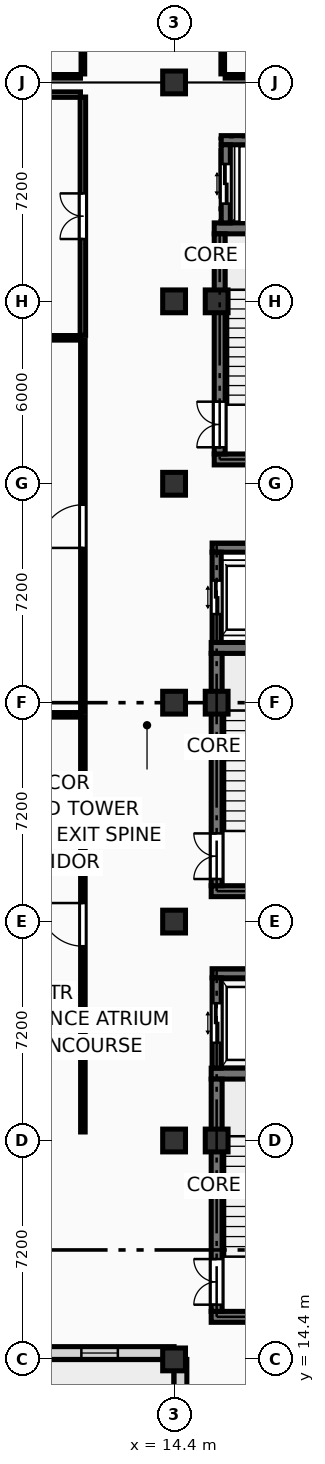
"""IFC4 building model, lengths in metres.
Left out: names, types, materials, properties, quantities, classifications, styles, units other than length and angle.
Written with IfcOpenShell. Run it as: python <this file> out.ifc"""

import sys

from ifc_helpers import new_model, si_unit, direction, frame, frame_2d, origin, origin_2d, place, context, subcontext, project, spatial, rectangle, extrude, element, fill, save


model = new_model("IFC4")
c1 = context("Model", 3, precision=1e-05, world=origin(), true_north=direction((0.0, 1.0)))
c2 = subcontext(c1, "Body", "Model", "MODEL_VIEW")
j1 = project(units=[si_unit("LENGTHUNIT", "METRE"), si_unit("PLANEANGLEUNIT", "RADIAN")], contexts=[c1])
p1 = place(None, origin())
s1 = spatial("IfcSite", under=j1, at=p1, CompositionType="ELEMENT")
p2 = place(p1, origin())
s2 = spatial("IfcBuilding", under=s1, at=p2, CompositionType="ELEMENT")
p3 = place(p2, origin())
s3 = spatial("IfcBuildingStorey", under=s2, at=p3, CompositionType="ELEMENT", Elevation=0.0)
for number, where, z_axis, x_axis in (
    (1, (14.4, 14.4, 0.0), (0.0, 0.0, 1.0), (1.0, 0.0, 0.0)),
    (2, (14.4, 21.6, 0.0), (0.0, 0.0, 1.0), (1.0, 0.0, 0.0)),
    (3, (14.4, 28.8, 0.0), (0.0, 0.0, 1.0), (1.0, 0.0, 0.0)),
    (4, (14.4, 36.0, 0.0), (0.0, 0.0, 1.0), (1.0, 0.0, 0.0)),
    (5, (14.4, 43.2, 0.0), (0.0, 0.0, 1.0), (1.0, 0.0, 0.0)),
    (6, (14.4, 49.2, 0.0), (0.0, 0.0, 1.0), (1.0, 0.0, 0.0)),
    (7, (14.4, 56.4, 0.0), (0.0, 0.0, 1.0), (1.0, 0.0, 0.0)),
    (8, (15.8, 21.6, 0.0), (0.0, 0.0, 1.0), (1.0, 0.0, 0.0)),
    (9, (15.8, 36.0, 0.0), (0.0, 0.0, 1.0), (1.0, 0.0, 0.0)),
    (10, (15.8, 49.2, 0.0), (0.0, 0.0, 1.0), (1.0, 0.0, 0.0)),
):
    element("IfcColumn", number, at=place(p3, frame(where, z_axis=z_axis, x_axis=x_axis)), inside=s3, PredefinedType="COLUMN", context=c2, shape_type="SweptSolid", body=[
        extrude(rectangle(XDim=0.75, YDim=0.75, at=origin_2d()), origin(), (0.0, 0.0, 1.0), 4.5),
    ])
p4 = place(p3, frame((14.61, 7.2, 0.0), z_axis=(0.0, 0.0, 1.0), x_axis=(0.0, 1.0, 0.0)))
e11 = element("IfcWall", 11, at=p4, inside=s3, PredefinedType="SOLIDWALL", context=c2, shape_type="SweptSolid", body=[
    extrude(rectangle(XDim=7.2, YDim=0.42, at=frame_2d((3.6, 0.0))), origin(), (0.0, 0.0, 1.0), 3.62),
])
p5 = place(p4, frame((1.783, 0.0, 0.45)))
e12 = element("IfcOpeningElement", 12, at=p5, cuts=e11, PredefinedType="OPENING", context=c2, shape_type="SweptSolid", body=[
    extrude(rectangle(XDim=1.3, YDim=2.35, at=frame_2d((0.65, 1.175))), frame((0.0, 0.222, 0.0), z_axis=(0.0, -1.0, 0.0), x_axis=(1.0, 0.0, 0.0)), (0.0, 0.0, 1.0), 0.444),
])
p6 = place(p4, frame((4.117, 0.0, 0.45)))
e13 = element("IfcOpeningElement", 13, at=p6, cuts=e11, PredefinedType="OPENING", context=c2, shape_type="SweptSolid", body=[
    extrude(rectangle(XDim=1.3, YDim=2.35, at=frame_2d((0.65, 1.175))), frame((0.0, 0.222, 0.0), z_axis=(0.0, -1.0, 0.0), x_axis=(1.0, 0.0, 0.0)), (0.0, 0.0, 1.0), 0.444),
])
p7 = place(p3, frame((7.2, 14.61, 0.0), z_axis=(0.0, 0.0, 1.0), x_axis=(1.0, 0.0, 0.0)))
e14 = element("IfcWall", 14, at=p7, inside=s3, PredefinedType="SOLIDWALL", context=c2, shape_type="SweptSolid", body=[
    extrude(rectangle(XDim=7.2, YDim=0.42, at=frame_2d((3.6, 0.0))), origin(), (0.0, 0.0, 1.0), 3.62),
])
p8 = place(p7, frame((1.85, 0.0, 0.45)))
e15 = element("IfcOpeningElement", 15, at=p8, cuts=e14, PredefinedType="OPENING", context=c2, shape_type="SweptSolid", body=[
    extrude(rectangle(XDim=1.2, YDim=2.35, at=frame_2d((0.6, 1.175))), frame((0.0, 0.222, 0.0), z_axis=(0.0, -1.0, 0.0), x_axis=(1.0, 0.0, 0.0)), (0.0, 0.0, 1.0), 0.444),
])
p9 = place(p7, frame((4.15, 0.0, 0.45)))
e16 = element("IfcOpeningElement", 16, at=p9, cuts=e14, PredefinedType="OPENING", context=c2, shape_type="SweptSolid", body=[
    extrude(rectangle(XDim=1.2, YDim=2.35, at=frame_2d((0.6, 1.175))), frame((0.0, 0.222, 0.0), z_axis=(0.0, -1.0, 0.0), x_axis=(1.0, 0.0, 0.0)), (0.0, 0.0, 1.0), 0.444),
])
for number, where, z_axis, x_axis in (
    (17, (15.62, 15.8, 0.0), (0.0, 0.0, 1.0), (1.0, 0.0, 0.0)),
    (18, (15.62, 23.8, 0.0), (0.0, 0.0, 1.0), (1.0, 0.0, 0.0)),
):
    element("IfcWall", number, at=place(p3, frame(where, z_axis=z_axis, x_axis=x_axis)), inside=s3, PredefinedType="SHEAR", context=c2, shape_type="SweptSolid", body=[
        extrude(rectangle(XDim=4.88, YDim=0.36, at=frame_2d((2.44, 0.0))), origin(), (0.0, 0.0, 1.0), 4.25),
    ])
p10 = place(p3, frame((15.8, 15.98, 0.0), z_axis=(0.0, 0.0, 1.0), x_axis=(0.0, 1.0, 0.0)))
e19 = element("IfcWall", 19, at=p10, inside=s3, PredefinedType="SHEAR", context=c2, shape_type="SweptSolid", body=[
    extrude(rectangle(XDim=7.64, YDim=0.36, at=frame_2d((3.82, 0.0))), origin(), (0.0, 0.0, 1.0), 4.25),
])
p11 = place(p10, frame((0.22, 0.0, 0.0)))
e20 = element("IfcOpeningElement", 20, at=p11, cuts=e19, PredefinedType="OPENING", context=c2, shape_type="SweptSolid", body=[
    extrude(rectangle(XDim=1.5, YDim=2.2, at=frame_2d((0.75, 1.1))), frame((0.0, 0.192, 0.0), z_axis=(0.0, -1.0, 0.0), x_axis=(1.0, 0.0, 0.0)), (0.0, 0.0, 1.0), 0.384),
])
for number, where, z_axis, x_axis in (
    (21, (15.62, 29.8, 0.0), (0.0, 0.0, 1.0), (1.0, 0.0, 0.0)),
    (22, (15.62, 37.8, 0.0), (0.0, 0.0, 1.0), (1.0, 0.0, 0.0)),
):
    element("IfcWall", number, at=place(p3, frame(where, z_axis=z_axis, x_axis=x_axis)), inside=s3, PredefinedType="SHEAR", context=c2, shape_type="SweptSolid", body=[
        extrude(rectangle(XDim=4.88, YDim=0.36, at=frame_2d((2.44, 0.0))), origin(), (0.0, 0.0, 1.0), 4.25),
    ])
p12 = place(p3, frame((15.8, 29.98, 0.0), z_axis=(0.0, 0.0, 1.0), x_axis=(0.0, 1.0, 0.0)))
e23 = element("IfcWall", 23, at=p12, inside=s3, PredefinedType="SHEAR", context=c2, shape_type="SweptSolid", body=[
    extrude(rectangle(XDim=7.64, YDim=0.36, at=frame_2d((3.82, 0.0))), origin(), (0.0, 0.0, 1.0), 4.25),
])
p13 = place(p12, frame((0.22, 0.0, 0.0)))
e24 = element("IfcOpeningElement", 24, at=p13, cuts=e23, PredefinedType="OPENING", context=c2, shape_type="SweptSolid", body=[
    extrude(rectangle(XDim=1.5, YDim=2.2, at=frame_2d((0.75, 1.1))), frame((0.0, 0.192, 0.0), z_axis=(0.0, -1.0, 0.0), x_axis=(1.0, 0.0, 0.0)), (0.0, 0.0, 1.0), 0.384),
])
for number, where, z_axis, x_axis in (
    (25, (15.72, 44.0, 0.0), (0.0, 0.0, 1.0), (1.0, 0.0, 0.0)),
    (26, (15.72, 51.6, 0.0), (0.0, 0.0, 1.0), (1.0, 0.0, 0.0)),
):
    element("IfcWall", number, at=place(p3, frame(where, z_axis=z_axis, x_axis=x_axis)), inside=s3, PredefinedType="SHEAR", context=c2, shape_type="SweptSolid", body=[
        extrude(rectangle(XDim=4.48, YDim=0.36, at=frame_2d((2.24, 0.0))), origin(), (0.0, 0.0, 1.0), 4.25),
    ])
p14 = place(p3, frame((15.9, 44.18, 0.0), z_axis=(0.0, 0.0, 1.0), x_axis=(0.0, 1.0, 0.0)))
e27 = element("IfcWall", 27, at=p14, inside=s3, PredefinedType="SHEAR", context=c2, shape_type="SweptSolid", body=[
    extrude(rectangle(XDim=7.24, YDim=0.36, at=frame_2d((3.62, 0.0))), origin(), (0.0, 0.0, 1.0), 4.25),
])
p15 = place(p14, frame((0.22, 0.0, 0.0)))
e28 = element("IfcOpeningElement", 28, at=p15, cuts=e27, PredefinedType="OPENING", context=c2, shape_type="SweptSolid", body=[
    extrude(rectangle(XDim=1.5, YDim=2.2, at=frame_2d((0.75, 1.1))), frame((0.0, 0.192, 0.0), z_axis=(0.0, -1.0, 0.0), x_axis=(1.0, 0.0, 0.0)), (0.0, 0.0, 1.0), 0.384),
])
p16 = place(p3, frame((15.65, 27.1, 0.0), z_axis=(0.0, 0.0, 1.0), x_axis=(1.0, 0.0, 0.0)))
e29 = element("IfcWall", 29, at=p16, inside=s3, PredefinedType="SHEAR", context=c2, shape_type="SweptSolid", body=[
    extrude(rectangle(XDim=2.56, YDim=0.3, at=frame_2d((1.28, 0.0))), origin(), (0.0, 0.0, 1.0), 4.25),
])
p17 = place(p3, frame((15.8, 23.98, 0.0), z_axis=(0.0, 0.0, 1.0), x_axis=(0.0, 1.0, 0.0)))
e30 = element("IfcWall", 30, at=p17, inside=s3, PredefinedType="SHEAR", context=c2, shape_type="SweptSolid", body=[
    extrude(rectangle(XDim=2.97, YDim=0.3, at=frame_2d((1.485, 0.0))), origin(), (0.0, 0.0, 1.0), 4.25),
])
p18 = place(p17, frame((0.835, 0.0, 0.0)))
e31 = element("IfcOpeningElement", 31, at=p18, cuts=e30, PredefinedType="OPENING", context=c2, shape_type="SweptSolid", body=[
    extrude(rectangle(XDim=1.3, YDim=2.25, at=frame_2d((0.65, 1.125))), frame((0.0, 0.162, 0.0), z_axis=(0.0, -1.0, 0.0), x_axis=(1.0, 0.0, 0.0)), (0.0, 0.0, 1.0), 0.324),
])
p19 = place(p3, frame((15.65, 41.1, 0.0), z_axis=(0.0, 0.0, 1.0), x_axis=(1.0, 0.0, 0.0)))
e32 = element("IfcWall", 32, at=p19, inside=s3, PredefinedType="SHEAR", context=c2, shape_type="SweptSolid", body=[
    extrude(rectangle(XDim=2.56, YDim=0.3, at=frame_2d((1.28, 0.0))), origin(), (0.0, 0.0, 1.0), 4.25),
])
p20 = place(p3, frame((15.8, 37.98, 0.0), z_axis=(0.0, 0.0, 1.0), x_axis=(0.0, 1.0, 0.0)))
e33 = element("IfcWall", 33, at=p20, inside=s3, PredefinedType="SHEAR", context=c2, shape_type="SweptSolid", body=[
    extrude(rectangle(XDim=2.97, YDim=0.3, at=frame_2d((1.485, 0.0))), origin(), (0.0, 0.0, 1.0), 4.25),
])
p21 = place(p20, frame((0.935, 0.0, 0.0)))
e34 = element("IfcOpeningElement", 34, at=p21, cuts=e33, PredefinedType="OPENING", context=c2, shape_type="SweptSolid", body=[
    extrude(rectangle(XDim=1.1, YDim=2.2, at=frame_2d((0.55, 1.1))), frame((0.0, 0.162, 0.0), z_axis=(0.0, -1.0, 0.0), x_axis=(1.0, 0.0, 0.0)), (0.0, 0.0, 1.0), 0.324),
])
p22 = place(p3, frame((15.95, 54.5, 0.0), z_axis=(0.0, 0.0, 1.0), x_axis=(1.0, 0.0, 0.0)))
e35 = element("IfcWall", 35, at=p22, inside=s3, PredefinedType="SHEAR", context=c2, shape_type="SweptSolid", body=[
    extrude(rectangle(XDim=3.0, YDim=0.3, at=frame_2d((1.5, 0.0))), origin(), (0.0, 0.0, 1.0), 4.25),
])
p23 = place(p3, frame((16.1, 51.78, 0.0), z_axis=(0.0, 0.0, 1.0), x_axis=(0.0, 1.0, 0.0)))
e36 = element("IfcWall", 36, at=p23, inside=s3, PredefinedType="SHEAR", context=c2, shape_type="SweptSolid", body=[
    extrude(rectangle(XDim=2.57, YDim=0.3, at=frame_2d((1.285, 0.0))), origin(), (0.0, 0.0, 1.0), 4.25),
])
p24 = place(p23, frame((0.635, 0.0, 0.0)))
e37 = element("IfcOpeningElement", 37, at=p24, cuts=e36, PredefinedType="OPENING", context=c2, shape_type="SweptSolid", body=[
    extrude(rectangle(XDim=1.3, YDim=2.25, at=frame_2d((0.65, 1.125))), frame((0.0, 0.162, 0.0), z_axis=(0.0, -1.0, 0.0), x_axis=(1.0, 0.0, 0.0)), (0.0, 0.0, 1.0), 0.324),
])
p25 = place(p3, frame((11.4, 21.88, 0.0), z_axis=(0.0, 0.0, 1.0), x_axis=(0.0, 1.0, 0.0)))
e38 = element("IfcWall", 38, at=p25, inside=s3, PredefinedType="PARTITIONING", context=c2, shape_type="SweptSolid", body=[
    extrude(rectangle(XDim=13.64, YDim=0.15, at=frame_2d((6.82, 0.0))), origin(), (0.0, 0.0, 1.0), 4.235),
])
p26 = place(p25, frame((6.11, 0.0, 0.0)))
e39 = element("IfcOpeningElement", 39, at=p26, cuts=e38, PredefinedType="OPENING", context=c2, shape_type="SweptSolid", body=[
    extrude(rectangle(XDim=1.42, YDim=2.22, at=frame_2d((0.71, 1.11))), frame((0.0, 0.087, 0.0), z_axis=(0.0, -1.0, 0.0), x_axis=(1.0, 0.0, 0.0)), (0.0, 0.0, 1.0), 0.174),
])
p27 = place(p3, frame((0.48, 35.6, 0.0), z_axis=(0.0, 0.0, 1.0), x_axis=(1.0, 0.0, 0.0)))
e40 = element("IfcWall", 40, at=p27, inside=s3, PredefinedType="PARTITIONING", context=c2, shape_type="SweptSolid", body=[
    extrude(rectangle(XDim=10.84, YDim=0.15, at=frame_2d((5.42, 0.0))), origin(), (0.0, 0.0, 1.0), 3.485),
])
p28 = place(p3, frame((11.4, 35.68, 0.0), z_axis=(0.0, 0.0, 1.0), x_axis=(0.0, 1.0, 0.0)))
e41 = element("IfcWall", 41, at=p28, inside=s3, PredefinedType="PARTITIONING", context=c2, shape_type="SweptSolid", body=[
    extrude(rectangle(XDim=12.24, YDim=0.15, at=frame_2d((6.12, 0.0))), origin(), (0.0, 0.0, 1.0), 4.235),
])
p29 = place(p28, frame((5.41, 0.0, 0.0)))
e42 = element("IfcOpeningElement", 42, at=p29, cuts=e41, PredefinedType="OPENING", context=c2, shape_type="SweptSolid", body=[
    extrude(rectangle(XDim=1.42, YDim=2.22, at=frame_2d((0.71, 1.11))), frame((0.0, 0.087, 0.0), z_axis=(0.0, -1.0, 0.0), x_axis=(1.0, 0.0, 0.0)), (0.0, 0.0, 1.0), 0.174),
])
p30 = place(p3, frame((0.48, 48.0, 0.0), z_axis=(0.0, 0.0, 1.0), x_axis=(1.0, 0.0, 0.0)))
e43 = element("IfcWall", 43, at=p30, inside=s3, PredefinedType="PARTITIONING", context=c2, shape_type="SweptSolid", body=[
    extrude(rectangle(XDim=10.84, YDim=0.15, at=frame_2d((5.42, 0.0))), origin(), (0.0, 0.0, 1.0), 4.235),
])
p31 = place(p3, frame((11.4, 48.08, 0.0), z_axis=(0.0, 0.0, 1.0), x_axis=(0.0, 1.0, 0.0)))
e44 = element("IfcWall", 44, at=p31, inside=s3, PredefinedType="PARTITIONING", context=c2, shape_type="SweptSolid", body=[
    extrude(rectangle(XDim=7.84, YDim=0.18, at=frame_2d((3.92, 0.0))), origin(), (0.0, 0.0, 1.0), 4.235),
])
p32 = place(p31, frame((3.17, 0.0, 0.0)))
e45 = element("IfcOpeningElement", 45, at=p32, cuts=e44, PredefinedType="OPENING", context=c2, shape_type="SweptSolid", body=[
    extrude(rectangle(XDim=1.5, YDim=2.25, at=frame_2d((0.75, 1.125))), frame((0.0, 0.102, 0.0), z_axis=(0.0, -1.0, 0.0), x_axis=(1.0, 0.0, 0.0)), (0.0, 0.0, 1.0), 0.204),
])
p33 = place(p3, frame((0.48, 56.0, 0.0), z_axis=(0.0, 0.0, 1.0), x_axis=(1.0, 0.0, 0.0)))
e46 = element("IfcWall", 46, at=p33, inside=s3, PredefinedType="PARTITIONING", context=c2, shape_type="SweptSolid", body=[
    extrude(rectangle(XDim=10.84, YDim=0.18, at=frame_2d((5.42, 0.0))), origin(), (0.0, 0.0, 1.0), 3.485),
])
p34 = place(p3, frame((0.48, 56.6, 0.0), z_axis=(0.0, 0.0, 1.0), x_axis=(1.0, 0.0, 0.0)))
e47 = element("IfcWall", 47, at=p34, inside=s3, PredefinedType="PARTITIONING", context=c2, shape_type="SweptSolid", body=[
    extrude(rectangle(XDim=10.84, YDim=0.12, at=frame_2d((5.42, 0.0))), origin(), (0.0, 0.0, 1.0), 3.485),
])
p35 = place(p3, frame((11.4, 56.68, 0.0), z_axis=(0.0, 0.0, 1.0), x_axis=(0.0, 1.0, 0.0)))
e48 = element("IfcWall", 48, at=p35, inside=s3, PredefinedType="PARTITIONING", context=c2, shape_type="SweptSolid", body=[
    extrude(rectangle(XDim=28.44, YDim=0.12, at=frame_2d((14.22, 0.0))), origin(), (0.0, 0.0, 1.0), 4.235),
])
p36 = place(p35, frame((13.37, 0.0, 0.0)))
e49 = element("IfcOpeningElement", 49, at=p36, cuts=e48, PredefinedType="OPENING", context=c2, shape_type="SweptSolid", body=[
    extrude(rectangle(XDim=1.7, YDim=2.28, at=frame_2d((0.85, 1.14))), frame((0.0, 0.072, 0.0), z_axis=(0.0, -1.0, 0.0), x_axis=(1.0, 0.0, 0.0)), (0.0, 0.0, 1.0), 0.144),
])
p37 = place(p3, frame((16.0, 56.68, 0.0), z_axis=(0.0, 0.0, 1.0), x_axis=(0.0, 1.0, 0.0)))
e50 = element("IfcWall", 50, at=p37, inside=s3, PredefinedType="PARTITIONING", context=c2, shape_type="SweptSolid", body=[
    extrude(rectangle(XDim=15.1, YDim=0.12, at=frame_2d((7.55, 0.0))), origin(), (0.0, 0.0, 1.0), 4.235),
])
p38 = place(p37, frame((8.32, 0.0, 0.0)))
e51 = element("IfcOpeningElement", 51, at=p38, cuts=e50, PredefinedType="OPENING", context=c2, shape_type="SweptSolid", body=[
    extrude(rectangle(XDim=1.7, YDim=2.28, at=frame_2d((0.85, 1.14))), frame((0.0, 0.072, 0.0), z_axis=(0.0, -1.0, 0.0), x_axis=(1.0, 0.0, 0.0)), (0.0, 0.0, 1.0), 0.144),
])
p39 = place(p3, frame((16.08, 56.6, 0.0), z_axis=(0.0, 0.0, 1.0), x_axis=(1.0, 0.0, 0.0)))
e52 = element("IfcWall", 52, at=p39, inside=s3, PredefinedType="PARTITIONING", context=c2, shape_type="SweptSolid", body=[
    extrude(rectangle(XDim=12.24, YDim=0.12, at=frame_2d((6.12, 0.0))), origin(), (0.0, 0.0, 1.0), 3.485),
])
p40 = place(p9, origin())
e53 = element("IfcWindow", 53, at=p40, inside=s3, PartitioningType="SINGLE_PANEL", PredefinedType="WINDOW", context=c2, shape_type="SweptSolid", body=[
    extrude(rectangle(XDim=1.2, YDim=2.35, at=frame_2d((0.6, 1.175))), frame((0.0, 0.03, 0.0), z_axis=(0.0, -1.0, 0.0), x_axis=(1.0, 0.0, 0.0)), (0.0, 0.0, 1.0), 0.06),
])
fill(e16, e53)
p41 = place(p11, origin())
e54 = element("IfcDoor", 54, at=p41, inside=s3, OperationType="DOUBLE_DOOR_SINGLE_SWING", PredefinedType="DOOR", context=c2, shape_type="SweptSolid", body=[
    extrude(rectangle(XDim=1.5, YDim=2.2, at=frame_2d((0.75, 1.1))), frame((0.0, 0.025, 0.0), z_axis=(0.0, -1.0, 0.0), x_axis=(1.0, 0.0, 0.0)), (0.0, 0.0, 1.0), 0.05),
])
fill(e20, e54)
p42 = place(p13, origin())
e55 = element("IfcDoor", 55, at=p42, inside=s3, OperationType="DOUBLE_DOOR_SINGLE_SWING", PredefinedType="DOOR", context=c2, shape_type="SweptSolid", body=[
    extrude(rectangle(XDim=1.5, YDim=2.2, at=frame_2d((0.75, 1.1))), frame((0.0, 0.025, 0.0), z_axis=(0.0, -1.0, 0.0), x_axis=(1.0, 0.0, 0.0)), (0.0, 0.0, 1.0), 0.05),
])
fill(e24, e55)
p43 = place(p15, origin())
e56 = element("IfcDoor", 56, at=p43, inside=s3, OperationType="DOUBLE_DOOR_SINGLE_SWING", PredefinedType="DOOR", context=c2, shape_type="SweptSolid", body=[
    extrude(rectangle(XDim=1.5, YDim=2.2, at=frame_2d((0.75, 1.1))), frame((0.0, 0.025, 0.0), z_axis=(0.0, -1.0, 0.0), x_axis=(1.0, 0.0, 0.0)), (0.0, 0.0, 1.0), 0.05),
])
fill(e28, e56)
p44 = place(p18, origin())
e57 = element("IfcDoor", 57, at=p44, inside=s3, OperationType="DOUBLE_DOOR_SLIDING", PredefinedType="DOOR", context=c2, shape_type="SweptSolid", body=[
    extrude(rectangle(XDim=1.3, YDim=2.25, at=frame_2d((0.65, 1.125))), frame((0.0, 0.025, 0.0), z_axis=(0.0, -1.0, 0.0), x_axis=(1.0, 0.0, 0.0)), (0.0, 0.0, 1.0), 0.05),
])
fill(e31, e57)
p45 = place(p21, origin())
e58 = element("IfcDoor", 58, at=p45, inside=s3, OperationType="DOUBLE_DOOR_SLIDING", PredefinedType="DOOR", context=c2, shape_type="SweptSolid", body=[
    extrude(rectangle(XDim=1.1, YDim=2.2, at=frame_2d((0.55, 1.1))), frame((0.0, 0.025, 0.0), z_axis=(0.0, -1.0, 0.0), x_axis=(1.0, 0.0, 0.0)), (0.0, 0.0, 1.0), 0.05),
])
fill(e34, e58)
p46 = place(p24, origin())
e59 = element("IfcDoor", 59, at=p46, inside=s3, OperationType="DOUBLE_DOOR_SLIDING", PredefinedType="DOOR", context=c2, shape_type="SweptSolid", body=[
    extrude(rectangle(XDim=1.3, YDim=2.25, at=frame_2d((0.65, 1.125))), frame((0.0, 0.025, 0.0), z_axis=(0.0, -1.0, 0.0), x_axis=(1.0, 0.0, 0.0)), (0.0, 0.0, 1.0), 0.05),
])
fill(e37, e59)
p47 = place(p26, origin())
e60 = element("IfcDoor", 60, at=p47, inside=s3, OperationType="SINGLE_SWING_RIGHT", PredefinedType="DOOR", context=c2, shape_type="SweptSolid", body=[
    extrude(rectangle(XDim=1.42, YDim=2.22, at=frame_2d((0.71, 1.11))), frame((0.0, 0.025, 0.0), z_axis=(0.0, -1.0, 0.0), x_axis=(1.0, 0.0, 0.0)), (0.0, 0.0, 1.0), 0.05),
])
fill(e39, e60)
p48 = place(p29, origin())
e61 = element("IfcDoor", 61, at=p48, inside=s3, OperationType="SINGLE_SWING_LEFT", PredefinedType="DOOR", context=c2, shape_type="SweptSolid", body=[
    extrude(rectangle(XDim=1.42, YDim=2.22, at=frame_2d((0.71, 1.11))), frame((0.0, 0.025, 0.0), z_axis=(0.0, -1.0, 0.0), x_axis=(1.0, 0.0, 0.0)), (0.0, 0.0, 1.0), 0.05),
])
fill(e42, e61)
p49 = place(p32, origin())
e62 = element("IfcDoor", 62, at=p49, inside=s3, OperationType="DOUBLE_DOOR_SINGLE_SWING", PredefinedType="DOOR", context=c2, shape_type="SweptSolid", body=[
    extrude(rectangle(XDim=1.5, YDim=2.25, at=frame_2d((0.75, 1.125))), frame((0.0, 0.025, 0.0), z_axis=(0.0, -1.0, 0.0), x_axis=(1.0, 0.0, 0.0)), (0.0, 0.0, 1.0), 0.05),
])
fill(e45, e62)
save(model, sys.argv[1])
